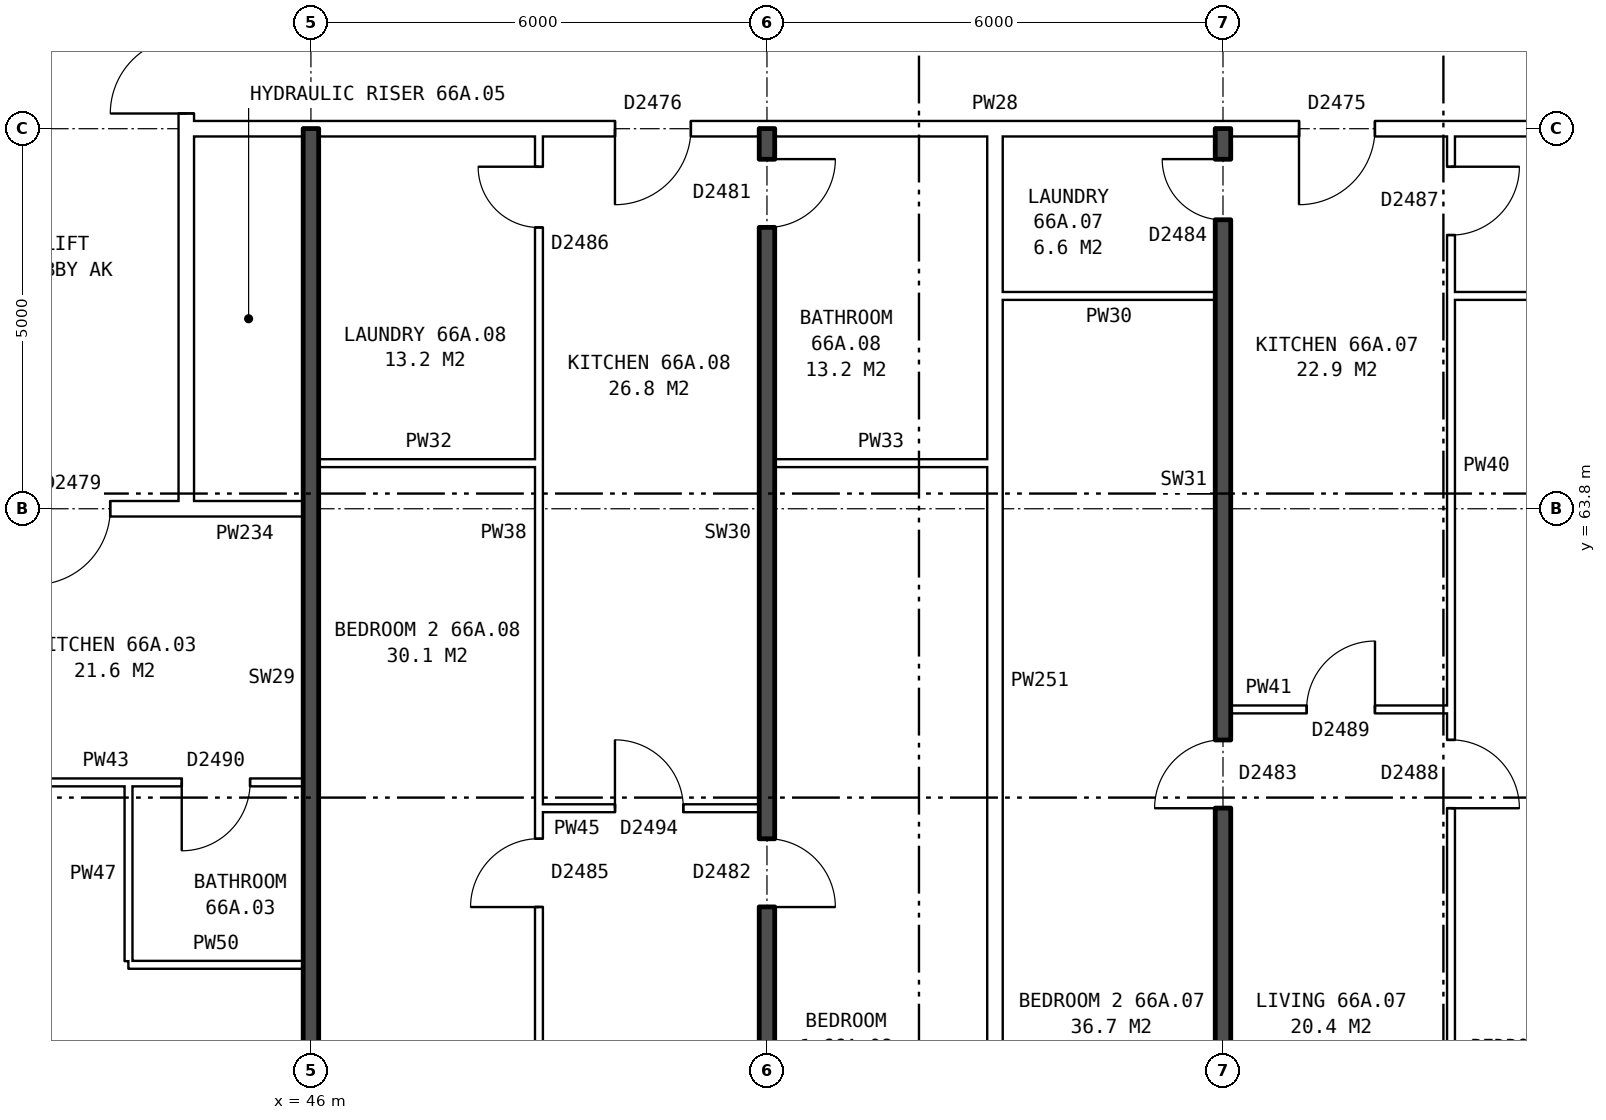
"""IFC4 building model, lengths in metres.
Left out: names, types, materials, properties, quantities, classifications, styles, units other than length and angle.
Written with IfcOpenShell. Run it as: python <this file> out.ifc"""

import sys

from ifc_helpers import new_model, si_unit, direction, frame, frame_2d, origin, place, context, subcontext, project, spatial, rectangle, extrude, element, fill, save


model = new_model("IFC4")
c1 = context("Model", 3, precision=1e-05, world=origin(), true_north=direction((0.0, 1.0)))
c2 = subcontext(c1, "Body", "Model", "MODEL_VIEW")
j1 = project(units=[si_unit("LENGTHUNIT", "METRE"), si_unit("PLANEANGLEUNIT", "RADIAN")], contexts=[c1])
p1 = place(None, origin())
s1 = spatial("IfcSite", under=j1, at=p1, CompositionType="ELEMENT")
p2 = place(p1, origin())
s2 = spatial("IfcBuilding", under=s1, at=p2, CompositionType="ELEMENT")
p3 = place(p2, frame((0.0, 0.0, 233.8)))
s3 = spatial("IfcBuildingStorey", under=s2, at=p3, CompositionType="ELEMENT", Elevation=233.8)
p4 = place(p3, frame((44.36, 63.9, 0.0), z_axis=(0.0, 0.0, 1.0), x_axis=(0.0, 1.0, 0.0)))
e1 = element("IfcWall", 1, at=p4, inside=s3, PredefinedType="PARTITIONING", context=c2, shape_type="SweptSolid", body=[
    extrude(rectangle(XDim=12.2, YDim=0.2, at=frame_2d((6.1, 0.0))), origin(), (0.0, 0.0, 1.0), 2.85),
])
p5 = place(p4, frame((5.1, 0.0, 0.0)))
e2 = element("IfcOpeningElement", 2, at=p5, cuts=e1, PredefinedType="OPENING", context=c2, shape_type="SweptSolid", body=[
    extrude(rectangle(XDim=2.0, YDim=2.1, at=frame_2d((1.0, 1.05))), frame((0.0, 0.11, 0.0), z_axis=(0.0, -1.0, 0.0), x_axis=(1.0, 0.0, 0.0)), (0.0, 0.0, 1.0), 0.22),
])
p6 = place(p3, frame((43.6, 57.8, 0.0), z_axis=(0.0, 0.0, 1.0), x_axis=(1.0, 0.0, 0.0)))
e3 = element("IfcWall", 3, at=p6, inside=s3, PredefinedType="PARTITIONING", context=c2, shape_type="SweptSolid", body=[
    extrude(rectangle(XDim=2.3, YDim=0.1, at=frame_2d((1.15, 0.0))), origin(), (0.0, 0.0, 1.0), 2.85),
])
p7 = place(p3, frame((49.0, 59.86, 0.0), z_axis=(0.0, 0.0, 1.0), x_axis=(1.0, 0.0, 0.0)))
e4 = element("IfcWall", 4, at=p7, inside=s3, PredefinedType="PARTITIONING", context=c2, shape_type="SweptSolid", body=[
    extrude(rectangle(XDim=2.9, YDim=0.1, at=frame_2d((1.45, 0.0))), origin(), (0.0, 0.0, 1.0), 2.85),
])
p8 = place(p7, frame((1.0, 0.0, 0.0)))
e5 = element("IfcOpeningElement", 5, at=p8, cuts=e4, PredefinedType="OPENING", context=c2, shape_type="SweptSolid", body=[
    extrude(rectangle(XDim=0.9, YDim=2.1, at=frame_2d((0.45, 1.05))), frame((0.0, 0.06, 0.0), z_axis=(0.0, -1.0, 0.0), x_axis=(1.0, 0.0, 0.0)), (0.0, 0.0, 1.0), 0.12),
])
p9 = place(p3, frame((40.1, 60.2, 0.0), z_axis=(0.0, 0.0, 1.0), x_axis=(1.0, 0.0, 0.0)))
e6 = element("IfcWall", 6, at=p9, inside=s3, PredefinedType="PARTITIONING", context=c2, shape_type="SweptSolid", body=[
    extrude(rectangle(XDim=5.8, YDim=0.1, at=frame_2d((2.9, 0.0))), origin(), (0.0, 0.0, 1.0), 2.85),
])
p10 = place(p9, frame((1.3, 0.0, 0.0)))
e7 = element("IfcOpeningElement", 7, at=p10, cuts=e6, PredefinedType="OPENING", context=c2, shape_type="SweptSolid", body=[
    extrude(rectangle(XDim=0.9, YDim=2.1, at=frame_2d((0.45, 1.05))), frame((0.0, 0.06, 0.0), z_axis=(0.0, -1.0, 0.0), x_axis=(1.0, 0.0, 0.0)), (0.0, 0.0, 1.0), 0.12),
])
p11 = place(p9, frame((4.2, 0.0, 0.0)))
e8 = element("IfcOpeningElement", 8, at=p11, cuts=e6, PredefinedType="OPENING", context=c2, shape_type="SweptSolid", body=[
    extrude(rectangle(XDim=0.9, YDim=2.1, at=frame_2d((0.45, 1.05))), frame((0.0, 0.06, 0.0), z_axis=(0.0, -1.0, 0.0), x_axis=(1.0, 0.0, 0.0)), (0.0, 0.0, 1.0), 0.12),
])
p12 = place(p3, frame((58.1, 61.16, 0.0), z_axis=(0.0, 0.0, 1.0), x_axis=(1.0, 0.0, 0.0)))
e9 = element("IfcWall", 9, at=p12, inside=s3, PredefinedType="PARTITIONING", context=c2, shape_type="SweptSolid", body=[
    extrude(rectangle(XDim=2.9, YDim=0.1, at=frame_2d((1.45, 0.0))), origin(), (0.0, 0.0, 1.0), 2.85),
])
p13 = place(p12, frame((1.0, 0.0, 0.0)))
e10 = element("IfcOpeningElement", 10, at=p13, cuts=e9, PredefinedType="OPENING", context=c2, shape_type="SweptSolid", body=[
    extrude(rectangle(XDim=0.9, YDim=2.1, at=frame_2d((0.45, 1.05))), frame((0.0, 0.06, 0.0), z_axis=(0.0, -1.0, 0.0), x_axis=(1.0, 0.0, 0.0)), (0.0, 0.0, 1.0), 0.12),
])
p14 = place(p3, frame((41.36, 63.8, 0.0), z_axis=(0.0, 0.0, 1.0), x_axis=(1.0, 0.0, 0.0)))
e11 = element("IfcWall", 11, at=p14, inside=s3, PredefinedType="PARTITIONING", context=c2, shape_type="SweptSolid", body=[
    extrude(rectangle(XDim=3.0, YDim=0.2, at=frame_2d((1.5, 0.0))), origin(), (0.0, 0.0, 1.0), 2.85),
])
p15 = place(p14, frame((1.0, 0.0, 0.0)))
e12 = element("IfcOpeningElement", 12, at=p15, cuts=e11, PredefinedType="OPENING", context=c2, shape_type="SweptSolid", body=[
    extrude(rectangle(XDim=1.0, YDim=2.1, at=frame_2d((0.5, 1.05))), frame((0.0, 0.11, 0.0), z_axis=(0.0, -1.0, 0.0), x_axis=(1.0, 0.0, 0.0)), (0.0, 0.0, 1.0), 0.22),
])
p16 = place(p3, frame((44.36, 63.8, 0.0), z_axis=(0.0, 0.0, 1.0), x_axis=(1.0, 0.0, 0.0)))
e13 = element("IfcWall", 13, at=p16, inside=s3, PredefinedType="PARTITIONING", context=c2, shape_type="SweptSolid", body=[
    extrude(rectangle(XDim=1.54, YDim=0.2, at=frame_2d((0.77, 0.0))), origin(), (0.0, 0.0, 1.0), 2.85),
])
p17 = place(p3, frame((46.1, 64.4, 0.0), z_axis=(0.0, 0.0, 1.0), x_axis=(1.0, 0.0, 0.0)))
e14 = element("IfcWall", 14, at=p17, inside=s3, PredefinedType="PARTITIONING", context=c2, shape_type="SweptSolid", body=[
    extrude(rectangle(XDim=2.9, YDim=0.1, at=frame_2d((1.45, 0.0))), origin(), (0.0, 0.0, 1.0), 2.85),
])
for number, where, z_axis, x_axis in (
    (15, (52.1, 64.4, 0.0), (0.0, 0.0, 1.0), (1.0, 0.0, 0.0)),
    (16, (55.1, 66.6, 0.0), (0.0, 0.0, 1.0), (1.0, 0.0, 0.0)),
):
    element("IfcWall", number, at=place(p3, frame(where, z_axis=z_axis, x_axis=x_axis)), inside=s3, PredefinedType="PARTITIONING", context=c2, shape_type="SweptSolid", body=[
        extrude(rectangle(XDim=2.8, YDim=0.1, at=frame_2d((1.4, 0.0))), origin(), (0.0, 0.0, 1.0), 2.85),
    ])
p18 = place(p3, frame((61.0, 66.6, 0.0), z_axis=(0.0, 0.0, 1.0), x_axis=(1.0, 0.0, 0.0)))
e17 = element("IfcWall", 17, at=p18, inside=s3, PredefinedType="PARTITIONING", context=c2, shape_type="SweptSolid", body=[
    extrude(rectangle(XDim=2.64, YDim=0.1, at=frame_2d((1.32, 0.0))), origin(), (0.0, 0.0, 1.0), 2.85),
])
p19 = place(p3, frame((44.36, 68.8, 0.0), z_axis=(0.0, 0.0, 1.0), x_axis=(1.0, 0.0, 0.0)))
e18 = element("IfcWall", 18, at=p19, inside=s3, PredefinedType="PARTITIONING", context=c2, shape_type="SweptSolid", body=[
    extrude(rectangle(XDim=19.28, YDim=0.2, at=frame_2d((9.64, 0.0))), origin(), (0.0, 0.0, 1.0), 2.85),
])
p20 = place(p19, frame((14.64, 0.0, 0.0)))
e19 = element("IfcOpeningElement", 19, at=p20, cuts=e18, PredefinedType="OPENING", context=c2, shape_type="SweptSolid", body=[
    extrude(rectangle(XDim=1.0, YDim=2.1, at=frame_2d((0.5, 1.05))), frame((0.0, 0.11, 0.0), z_axis=(0.0, -1.0, 0.0), x_axis=(1.0, 0.0, 0.0)), (0.0, 0.0, 1.0), 0.22),
])
p21 = place(p19, frame((5.64, 0.0, 0.0)))
e20 = element("IfcOpeningElement", 20, at=p21, cuts=e18, PredefinedType="OPENING", context=c2, shape_type="SweptSolid", body=[
    extrude(rectangle(XDim=1.0, YDim=2.1, at=frame_2d((0.5, 1.05))), frame((0.0, 0.11, 0.0), z_axis=(0.0, -1.0, 0.0), x_axis=(1.0, 0.0, 0.0)), (0.0, 0.0, 1.0), 0.22),
])
p22 = place(p3, frame((43.6, 57.85, 0.0), z_axis=(0.0, 0.0, 1.0), x_axis=(0.0, 1.0, 0.0)))
e21 = element("IfcWall", 21, at=p22, inside=s3, PredefinedType="PARTITIONING", context=c2, shape_type="SweptSolid", body=[
    extrude(rectangle(XDim=2.3, YDim=0.1, at=frame_2d((1.15, 0.0))), origin(), (0.0, 0.0, 1.0), 2.85),
])
p23 = place(p3, frame((46.0, 54.36, 0.0), z_axis=(0.0, 0.0, 1.0), x_axis=(0.0, 1.0, 0.0)))
e22 = element("IfcWall", 22, at=p23, inside=s3, PredefinedType="SOLIDWALL", context=c2, shape_type="SweptSolid", body=[
    extrude(rectangle(XDim=14.44, YDim=0.2, at=frame_2d((7.22, 0.0))), origin(), (0.0, 0.0, 1.0), 2.85),
])
p24 = place(p3, frame((49.0, 54.36, 0.0), z_axis=(0.0, 0.0, 1.0), x_axis=(0.0, 1.0, 0.0)))
e23 = element("IfcWall", 23, at=p24, inside=s3, PredefinedType="PARTITIONING", context=c2, shape_type="SweptSolid", body=[
    extrude(rectangle(XDim=14.34, YDim=0.1, at=frame_2d((7.17, 0.0))), origin(), (0.0, 0.0, 1.0), 2.85),
])
p25 = place(p24, frame((4.2, 0.0, 0.0)))
e24 = element("IfcOpeningElement", 24, at=p25, cuts=e23, PredefinedType="OPENING", context=c2, shape_type="SweptSolid", body=[
    extrude(rectangle(XDim=0.9, YDim=2.1, at=frame_2d((0.45, 1.05))), frame((0.0, 0.06, 0.0), z_axis=(0.0, -1.0, 0.0), x_axis=(1.0, 0.0, 0.0)), (0.0, 0.0, 1.0), 0.12),
])
p26 = place(p24, frame((13.14, 0.0, 0.0)))
e25 = element("IfcOpeningElement", 25, at=p26, cuts=e23, PredefinedType="OPENING", context=c2, shape_type="SweptSolid", body=[
    extrude(rectangle(XDim=0.8, YDim=2.1, at=frame_2d((0.4, 1.05))), frame((0.0, 0.06, 0.0), z_axis=(0.0, -1.0, 0.0), x_axis=(1.0, 0.0, 0.0)), (0.0, 0.0, 1.0), 0.12),
])
p27 = place(p3, frame((52.0, 54.36, 0.0), z_axis=(0.0, 0.0, 1.0), x_axis=(0.0, 1.0, 0.0)))
e26 = element("IfcWall", 26, at=p27, inside=s3, PredefinedType="SOLIDWALL", context=c2, shape_type="SweptSolid", body=[
    extrude(rectangle(XDim=14.44, YDim=0.2, at=frame_2d((7.22, 0.0))), origin(), (0.0, 0.0, 1.0), 2.85),
])
p28 = place(p27, frame((4.2, 0.0, 0.0)))
e27 = element("IfcOpeningElement", 27, at=p28, cuts=e26, PredefinedType="OPENING", context=c2, shape_type="SweptSolid", body=[
    extrude(rectangle(XDim=0.9, YDim=2.1, at=frame_2d((0.45, 1.05))), frame((0.0, 0.11, 0.0), z_axis=(0.0, -1.0, 0.0), x_axis=(1.0, 0.0, 0.0)), (0.0, 0.0, 1.0), 0.22),
])
p29 = place(p27, frame((13.14, 0.0, 0.0)))
e28 = element("IfcOpeningElement", 28, at=p29, cuts=e26, PredefinedType="OPENING", context=c2, shape_type="SweptSolid", body=[
    extrude(rectangle(XDim=0.9, YDim=2.1, at=frame_2d((0.45, 1.05))), frame((0.0, 0.11, 0.0), z_axis=(0.0, -1.0, 0.0), x_axis=(1.0, 0.0, 0.0)), (0.0, 0.0, 1.0), 0.22),
])
p30 = place(p3, frame((55.0, 54.36, 0.0), z_axis=(0.0, 0.0, 1.0), x_axis=(0.0, 1.0, 0.0)))
e29 = element("IfcWall", 29, at=p30, inside=s3, PredefinedType="PARTITIONING", context=c2, shape_type="SweptSolid", body=[
    extrude(rectangle(XDim=14.34, YDim=0.2, at=frame_2d((7.17, 0.0))), origin(), (0.0, 0.0, 1.0), 2.85),
])
p31 = place(p3, frame((58.0, 54.36, 0.0), z_axis=(0.0, 0.0, 1.0), x_axis=(0.0, 1.0, 0.0)))
e30 = element("IfcWall", 30, at=p31, inside=s3, PredefinedType="SOLIDWALL", context=c2, shape_type="SweptSolid", body=[
    extrude(rectangle(XDim=14.44, YDim=0.2, at=frame_2d((7.22, 0.0))), origin(), (0.0, 0.0, 1.0), 2.85),
])
p32 = place(p31, frame((5.5, 0.0, 0.0)))
e31 = element("IfcOpeningElement", 31, at=p32, cuts=e30, PredefinedType="OPENING", context=c2, shape_type="SweptSolid", body=[
    extrude(rectangle(XDim=0.9, YDim=2.1, at=frame_2d((0.45, 1.05))), frame((0.0, 0.11, 0.0), z_axis=(0.0, -1.0, 0.0), x_axis=(1.0, 0.0, 0.0)), (0.0, 0.0, 1.0), 0.22),
])
p33 = place(p31, frame((13.24, 0.0, 0.0)))
e32 = element("IfcOpeningElement", 32, at=p33, cuts=e30, PredefinedType="OPENING", context=c2, shape_type="SweptSolid", body=[
    extrude(rectangle(XDim=0.8, YDim=2.1, at=frame_2d((0.4, 1.05))), frame((0.0, 0.11, 0.0), z_axis=(0.0, -1.0, 0.0), x_axis=(1.0, 0.0, 0.0)), (0.0, 0.0, 1.0), 0.22),
])
p34 = place(p3, frame((61.0, 54.36, 0.0), z_axis=(0.0, 0.0, 1.0), x_axis=(0.0, 1.0, 0.0)))
e33 = element("IfcWall", 33, at=p34, inside=s3, PredefinedType="PARTITIONING", context=c2, shape_type="SweptSolid", body=[
    extrude(rectangle(XDim=14.34, YDim=0.1, at=frame_2d((7.17, 0.0))), origin(), (0.0, 0.0, 1.0), 2.85),
])
p35 = place(p34, frame((5.5, 0.0, 0.0)))
e34 = element("IfcOpeningElement", 34, at=p35, cuts=e33, PredefinedType="OPENING", context=c2, shape_type="SweptSolid", body=[
    extrude(rectangle(XDim=0.9, YDim=2.1, at=frame_2d((0.45, 1.05))), frame((0.0, 0.06, 0.0), z_axis=(0.0, -1.0, 0.0), x_axis=(1.0, 0.0, 0.0)), (0.0, 0.0, 1.0), 0.12),
])
p36 = place(p34, frame((13.04, 0.0, 0.0)))
e35 = element("IfcOpeningElement", 35, at=p36, cuts=e33, PredefinedType="OPENING", context=c2, shape_type="SweptSolid", body=[
    extrude(rectangle(XDim=0.9, YDim=2.1, at=frame_2d((0.45, 1.05))), frame((0.0, 0.06, 0.0), z_axis=(0.0, -1.0, 0.0), x_axis=(1.0, 0.0, 0.0)), (0.0, 0.0, 1.0), 0.12),
])
p37 = place(p5, origin())
e36 = element("IfcDoor", 36, at=p37, inside=s3, OperationType="DOUBLE_DOOR_SINGLE_SWING", PredefinedType="DOOR", context=c2, shape_type="SweptSolid", body=[
    extrude(rectangle(XDim=2.0, YDim=2.1, at=frame_2d((1.0, 1.05))), frame((0.0, 0.025, 0.0), z_axis=(0.0, -1.0, 0.0), x_axis=(1.0, 0.0, 0.0)), (0.0, 0.0, 1.0), 0.05),
])
fill(e2, e36)
p38 = place(p15, frame((1.0, 0.0, 0.0), z_axis=(0.0, 0.0, 1.0), x_axis=(-1.0, 0.0, 0.0)))
e37 = element("IfcDoor", 37, at=p38, inside=s3, OperationType="SINGLE_SWING_RIGHT", PredefinedType="DOOR", context=c2, shape_type="SweptSolid", body=[
    extrude(rectangle(XDim=1.0, YDim=2.1, at=frame_2d((0.5, 1.05))), frame((0.0, 0.025, 0.0), z_axis=(0.0, -1.0, 0.0), x_axis=(1.0, 0.0, 0.0)), (0.0, 0.0, 1.0), 0.05),
])
fill(e12, e37)
p39 = place(p11, frame((0.9, 0.0, 0.0), z_axis=(0.0, 0.0, 1.0), x_axis=(-1.0, 0.0, 0.0)))
e38 = element("IfcDoor", 38, at=p39, inside=s3, OperationType="SINGLE_SWING_RIGHT", PredefinedType="DOOR", context=c2, shape_type="SweptSolid", body=[
    extrude(rectangle(XDim=0.9, YDim=2.1, at=frame_2d((0.45, 1.05))), frame((0.0, 0.025, 0.0), z_axis=(0.0, -1.0, 0.0), x_axis=(1.0, 0.0, 0.0)), (0.0, 0.0, 1.0), 0.05),
])
fill(e8, e38)
p40 = place(p35, frame((0.9, 0.0, 0.0), z_axis=(0.0, 0.0, 1.0), x_axis=(-1.0, 0.0, 0.0)))
e39 = element("IfcDoor", 39, at=p40, inside=s3, OperationType="SINGLE_SWING_RIGHT", PredefinedType="DOOR", context=c2, shape_type="SweptSolid", body=[
    extrude(rectangle(XDim=0.9, YDim=2.1, at=frame_2d((0.45, 1.05))), frame((0.0, 0.025, 0.0), z_axis=(0.0, -1.0, 0.0), x_axis=(1.0, 0.0, 0.0)), (0.0, 0.0, 1.0), 0.05),
])
fill(e34, e39)
p41 = place(p32, origin())
e40 = element("IfcDoor", 40, at=p41, inside=s3, OperationType="SINGLE_SWING_LEFT", PredefinedType="DOOR", context=c2, shape_type="SweptSolid", body=[
    extrude(rectangle(XDim=0.9, YDim=2.1, at=frame_2d((0.45, 1.05))), frame((0.0, 0.025, 0.0), z_axis=(0.0, -1.0, 0.0), x_axis=(1.0, 0.0, 0.0)), (0.0, 0.0, 1.0), 0.05),
])
fill(e31, e40)
p42 = place(p20, frame((1.0, 0.0, 0.0), z_axis=(0.0, 0.0, 1.0), x_axis=(-1.0, 0.0, 0.0)))
e41 = element("IfcDoor", 41, at=p42, inside=s3, OperationType="SINGLE_SWING_RIGHT", PredefinedType="DOOR", context=c2, shape_type="SweptSolid", body=[
    extrude(rectangle(XDim=1.0, YDim=2.1, at=frame_2d((0.5, 1.05))), frame((0.0, 0.025, 0.0), z_axis=(0.0, -1.0, 0.0), x_axis=(1.0, 0.0, 0.0)), (0.0, 0.0, 1.0), 0.05),
])
fill(e19, e41)
p43 = place(p13, origin())
e42 = element("IfcDoor", 42, at=p43, inside=s3, OperationType="SINGLE_SWING_RIGHT", PredefinedType="DOOR", context=c2, shape_type="SweptSolid", body=[
    extrude(rectangle(XDim=0.9, YDim=2.1, at=frame_2d((0.45, 1.05))), frame((0.0, 0.025, 0.0), z_axis=(0.0, -1.0, 0.0), x_axis=(1.0, 0.0, 0.0)), (0.0, 0.0, 1.0), 0.05),
])
fill(e10, e42)
p44 = place(p36, frame((0.9, 0.0, 0.0), z_axis=(0.0, 0.0, 1.0), x_axis=(-1.0, 0.0, 0.0)))
e43 = element("IfcDoor", 43, at=p44, inside=s3, OperationType="SINGLE_SWING_LEFT", PredefinedType="DOOR", context=c2, shape_type="SweptSolid", body=[
    extrude(rectangle(XDim=0.9, YDim=2.1, at=frame_2d((0.45, 1.05))), frame((0.0, 0.025, 0.0), z_axis=(0.0, -1.0, 0.0), x_axis=(1.0, 0.0, 0.0)), (0.0, 0.0, 1.0), 0.05),
])
fill(e35, e43)
p45 = place(p33, origin())
e44 = element("IfcDoor", 44, at=p45, inside=s3, OperationType="SINGLE_SWING_RIGHT", PredefinedType="DOOR", context=c2, shape_type="SweptSolid", body=[
    extrude(rectangle(XDim=0.8, YDim=2.1, at=frame_2d((0.4, 1.05))), frame((0.0, 0.025, 0.0), z_axis=(0.0, -1.0, 0.0), x_axis=(1.0, 0.0, 0.0)), (0.0, 0.0, 1.0), 0.05),
])
fill(e32, e44)
p46 = place(p28, frame((0.9, 0.0, 0.0), z_axis=(0.0, 0.0, 1.0), x_axis=(-1.0, 0.0, 0.0)))
e45 = element("IfcDoor", 45, at=p46, inside=s3, OperationType="SINGLE_SWING_RIGHT", PredefinedType="DOOR", context=c2, shape_type="SweptSolid", body=[
    extrude(rectangle(XDim=0.9, YDim=2.1, at=frame_2d((0.45, 1.05))), frame((0.0, 0.025, 0.0), z_axis=(0.0, -1.0, 0.0), x_axis=(1.0, 0.0, 0.0)), (0.0, 0.0, 1.0), 0.05),
])
fill(e27, e45)
p47 = place(p25, origin())
e46 = element("IfcDoor", 46, at=p47, inside=s3, OperationType="SINGLE_SWING_LEFT", PredefinedType="DOOR", context=c2, shape_type="SweptSolid", body=[
    extrude(rectangle(XDim=0.9, YDim=2.1, at=frame_2d((0.45, 1.05))), frame((0.0, 0.025, 0.0), z_axis=(0.0, -1.0, 0.0), x_axis=(1.0, 0.0, 0.0)), (0.0, 0.0, 1.0), 0.05),
])
fill(e24, e46)
p48 = place(p21, frame((1.0, 0.0, 0.0), z_axis=(0.0, 0.0, 1.0), x_axis=(-1.0, 0.0, 0.0)))
e47 = element("IfcDoor", 47, at=p48, inside=s3, OperationType="SINGLE_SWING_RIGHT", PredefinedType="DOOR", context=c2, shape_type="SweptSolid", body=[
    extrude(rectangle(XDim=1.0, YDim=2.1, at=frame_2d((0.5, 1.05))), frame((0.0, 0.025, 0.0), z_axis=(0.0, -1.0, 0.0), x_axis=(1.0, 0.0, 0.0)), (0.0, 0.0, 1.0), 0.05),
])
fill(e20, e47)
p49 = place(p8, origin())
e48 = element("IfcDoor", 48, at=p49, inside=s3, OperationType="SINGLE_SWING_LEFT", PredefinedType="DOOR", context=c2, shape_type="SweptSolid", body=[
    extrude(rectangle(XDim=0.9, YDim=2.1, at=frame_2d((0.45, 1.05))), frame((0.0, 0.025, 0.0), z_axis=(0.0, -1.0, 0.0), x_axis=(1.0, 0.0, 0.0)), (0.0, 0.0, 1.0), 0.05),
])
fill(e5, e48)
p50 = place(p29, frame((0.9, 0.0, 0.0), z_axis=(0.0, 0.0, 1.0), x_axis=(-1.0, 0.0, 0.0)))
e49 = element("IfcDoor", 49, at=p50, inside=s3, OperationType="SINGLE_SWING_LEFT", PredefinedType="DOOR", context=c2, shape_type="SweptSolid", body=[
    extrude(rectangle(XDim=0.9, YDim=2.1, at=frame_2d((0.45, 1.05))), frame((0.0, 0.025, 0.0), z_axis=(0.0, -1.0, 0.0), x_axis=(1.0, 0.0, 0.0)), (0.0, 0.0, 1.0), 0.05),
])
fill(e28, e49)
p51 = place(p26, origin())
e50 = element("IfcDoor", 50, at=p51, inside=s3, OperationType="SINGLE_SWING_RIGHT", PredefinedType="DOOR", context=c2, shape_type="SweptSolid", body=[
    extrude(rectangle(XDim=0.8, YDim=2.1, at=frame_2d((0.4, 1.05))), frame((0.0, 0.025, 0.0), z_axis=(0.0, -1.0, 0.0), x_axis=(1.0, 0.0, 0.0)), (0.0, 0.0, 1.0), 0.05),
])
fill(e25, e50)
save(model, sys.argv[1])
